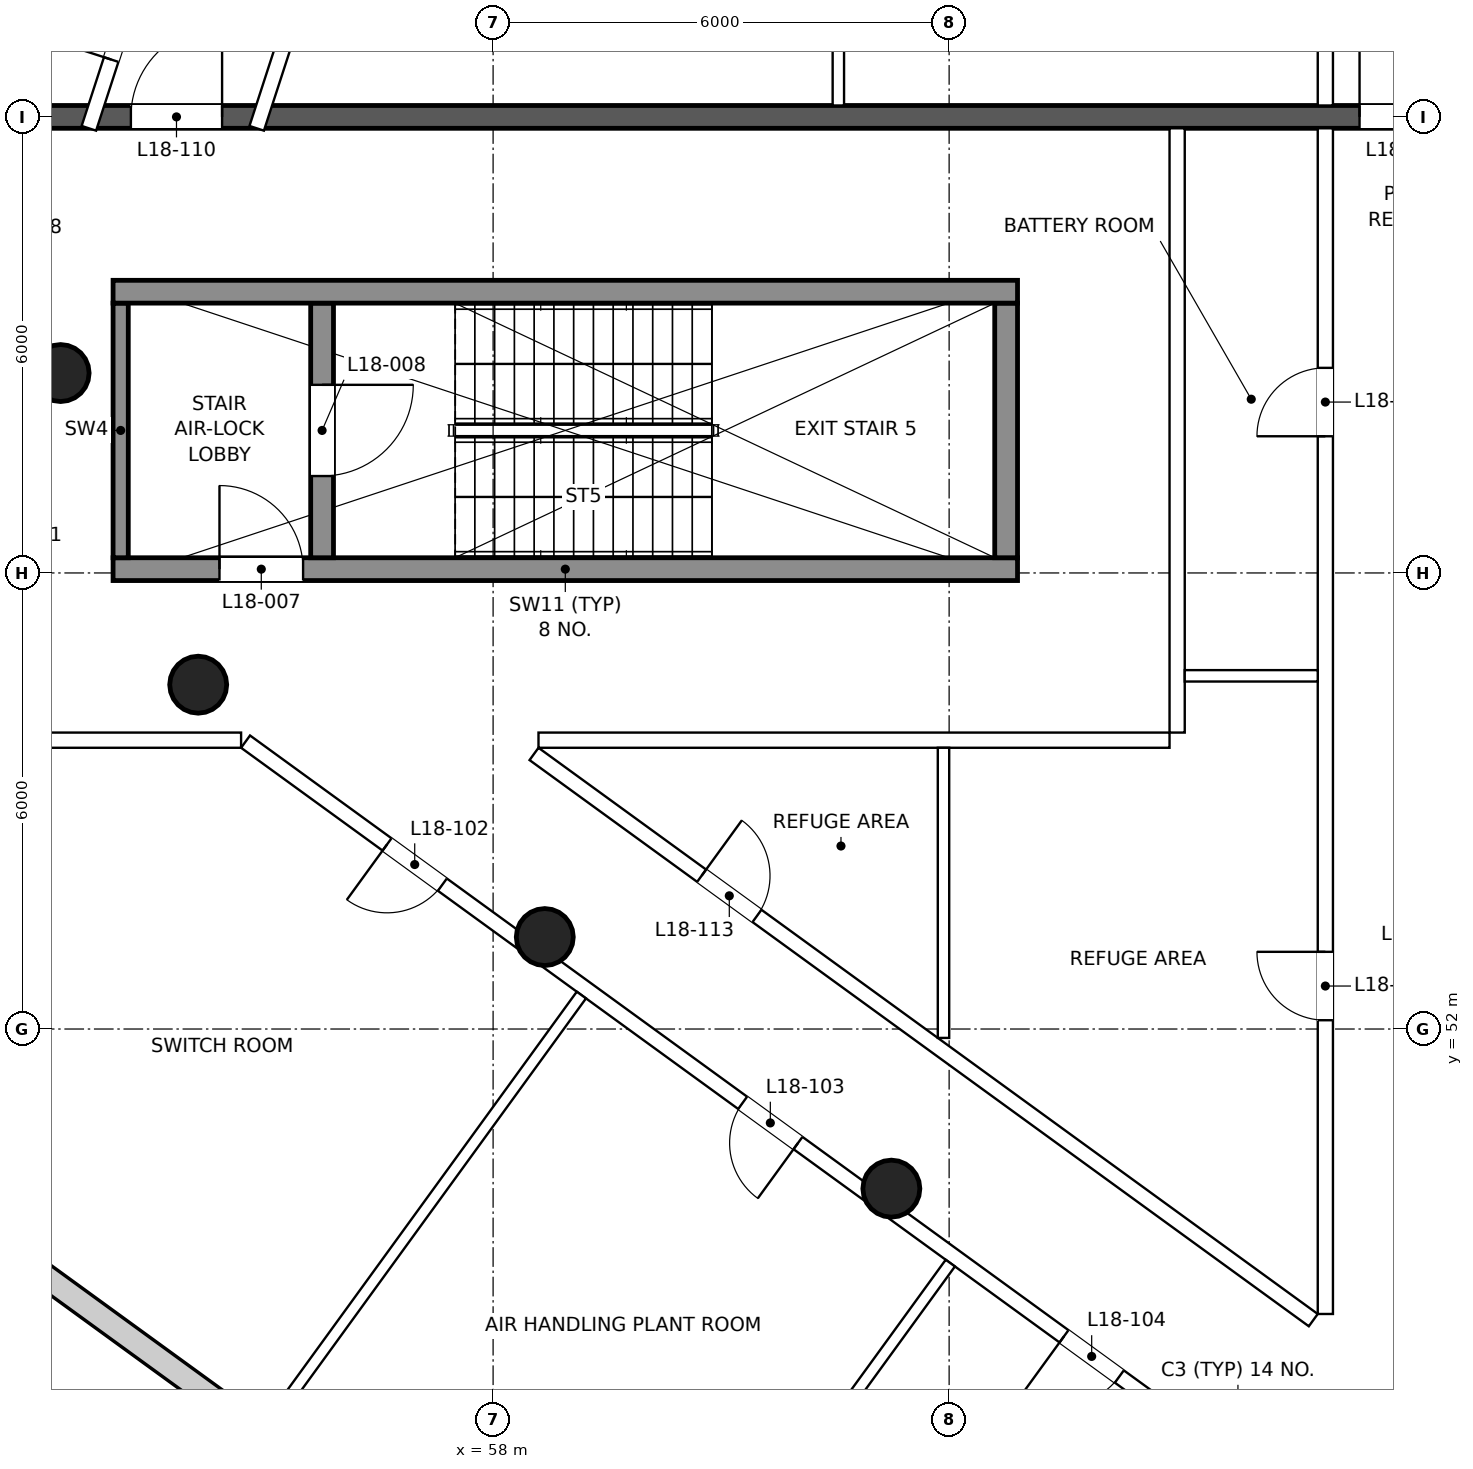
"""IFC4 building model, lengths in metres.
Left out: names, types, materials, properties, quantities, classifications, styles, units other than length and angle.
Written with IfcOpenShell. Run it as: python <this file> out.ifc"""

import sys

from ifc_helpers import new_model, si_unit, direction, frame, frame_2d, origin, origin_2d, place, context, subcontext, project, spatial, rectangle, circle, extrude, element, fill, save


model = new_model("IFC4")
c1 = context("Model", 3, precision=1e-05, world=origin(), true_north=direction((0.0, 1.0)))
c2 = subcontext(c1, "Body", "Model", "MODEL_VIEW")
j1 = project(units=[si_unit("LENGTHUNIT", "METRE"), si_unit("PLANEANGLEUNIT", "RADIAN")], contexts=[c1])
p1 = place(None, origin())
s1 = spatial("IfcSite", under=j1, at=p1, CompositionType="ELEMENT")
p2 = place(p1, origin())
s2 = spatial("IfcBuilding", under=s1, at=p2, CompositionType="ELEMENT")
p3 = place(p2, frame((0.0, 0.0, 85.8)))
s3 = spatial("IfcBuildingStorey", under=s2, at=p3, CompositionType="ELEMENT", Elevation=85.8)
for number, where, z_axis, x_axis in (
    (1, (52.31, 60.63, 0.0), (0.0, 0.0, 1.0), (1.0, 0.0, 0.0)),
    (2, (54.12, 56.53, 0.0), (0.0, 0.0, 1.0), (1.0, 0.0, 0.0)),
    (3, (58.68, 53.21, 0.0), (0.0, 0.0, 1.0), (1.0, 0.0, 0.0)),
    (4, (63.24, 49.9, 0.0), (0.0, 0.0, 1.0), (1.0, 0.0, 0.0)),
):
    element("IfcColumn", number, at=place(p3, frame(where, z_axis=z_axis, x_axis=x_axis)), inside=s3, PredefinedType="COLUMN", context=c2, shape_type="SweptSolid", body=[
        extrude(circle(Radius=0.375, at=origin_2d()), origin(), (0.0, 0.0, 1.0), 5.0),
    ])
p4 = place(p3, frame((47.033, 52.434, 0.0), z_axis=(0.0, 0.0, 1.0), x_axis=(0.809018497564, -0.587783183325, 0.0)))
e5 = element("IfcWall", 5, at=p4, inside=s3, PredefinedType="SOLIDWALL", context=c2, shape_type="SweptSolid", body=[
    extrude(rectangle(XDim=22.609, YDim=0.32, at=frame_2d((11.305, 0.0))), origin(), (0.0, 0.0, 1.0), 4.7),
])
p5 = place(p3, frame((53.0, 58.05, 0.0), z_axis=(0.0, 0.0, 1.0), x_axis=(1.0, 0.0, 0.0)))
e6 = element("IfcWall", 6, at=p5, inside=s3, PredefinedType="SHEAR", context=c2, shape_type="SweptSolid", body=[
    extrude(rectangle(XDim=11.9, YDim=0.3, at=frame_2d((5.95, 0.0))), origin(), (0.0, 0.0, 1.0), 5.0),
])
p6 = place(p5, frame((1.4, 0.0, 0.0)))
e7 = element("IfcOpeningElement", 7, at=p6, cuts=e6, PredefinedType="OPENING", context=c2, shape_type="SweptSolid", body=[
    extrude(rectangle(XDim=1.1, YDim=2.1, at=frame_2d((0.55, 1.05))), frame((0.0, 0.16, 0.0), z_axis=(0.0, -1.0, 0.0), x_axis=(1.0, 0.0, 0.0)), (0.0, 0.0, 1.0), 0.32),
])
p7 = place(p3, frame((53.1, 58.2, 0.0), z_axis=(0.0, 0.0, 1.0), x_axis=(0.0, 1.0, 0.0)))
e8 = element("IfcWall", 8, at=p7, inside=s3, PredefinedType="SHEAR", context=c2, shape_type="SweptSolid", body=[
    extrude(rectangle(XDim=3.35, YDim=0.2, at=frame_2d((1.675, 0.0))), origin(), (0.0, 0.0, 1.0), 5.0),
])
p8 = place(p3, frame((55.75, 58.2, 0.0), z_axis=(0.0, 0.0, 1.0), x_axis=(0.0, 1.0, 0.0)))
e9 = element("IfcWall", 9, at=p8, inside=s3, PredefinedType="SHEAR", context=c2, shape_type="SweptSolid", body=[
    extrude(rectangle(XDim=3.35, YDim=0.3, at=frame_2d((1.675, 0.0))), origin(), (0.0, 0.0, 1.0), 5.0),
])
p9 = place(p8, frame((1.075, 0.0, 0.0)))
e10 = element("IfcOpeningElement", 10, at=p9, cuts=e9, PredefinedType="OPENING", context=c2, shape_type="SweptSolid", body=[
    extrude(rectangle(XDim=1.2, YDim=2.1, at=frame_2d((0.6, 1.05))), frame((0.0, 0.16, 0.0), z_axis=(0.0, -1.0, 0.0), x_axis=(1.0, 0.0, 0.0)), (0.0, 0.0, 1.0), 0.32),
])
p10 = place(p3, frame((64.75, 58.2, 0.0), z_axis=(0.0, 0.0, 1.0), x_axis=(0.0, 1.0, 0.0)))
e11 = element("IfcWall", 11, at=p10, inside=s3, PredefinedType="SHEAR", context=c2, shape_type="SweptSolid", body=[
    extrude(rectangle(XDim=3.35, YDim=0.3, at=frame_2d((1.675, 0.0))), origin(), (0.0, 0.0, 1.0), 5.0),
])
p11 = place(p3, frame((53.0, 61.7, 0.0), z_axis=(0.0, 0.0, 1.0), x_axis=(1.0, 0.0, 0.0)))
e12 = element("IfcWall", 12, at=p11, inside=s3, PredefinedType="SHEAR", context=c2, shape_type="SweptSolid", body=[
    extrude(rectangle(XDim=11.9, YDim=0.3, at=frame_2d((5.95, 0.0))), origin(), (0.0, 0.0, 1.0), 5.0),
])
p12 = place(p3, frame((45.286, 64.0, 0.0), z_axis=(0.0, 0.0, 1.0), x_axis=(1.0, 0.0, 0.0)))
e13 = element("IfcWall", 13, at=p12, inside=s3, PredefinedType="PARTITIONING", context=c2, shape_type="SweptSolid", body=[
    extrude(rectangle(XDim=49.428, YDim=0.3, at=frame_2d((24.714, 0.0))), origin(), (0.0, 0.0, 1.0), 3.7),
])
p13 = place(p12, frame((7.948, 0.0, 0.0)))
e14 = element("IfcOpeningElement", 14, at=p13, cuts=e13, PredefinedType="OPENING", context=c2, shape_type="SweptSolid", body=[
    extrude(rectangle(XDim=1.2, YDim=2.1, at=frame_2d((0.6, 1.05))), frame((0.0, 0.16, 0.0), z_axis=(0.0, -1.0, 0.0), x_axis=(1.0, 0.0, 0.0)), (0.0, 0.0, 1.0), 0.32),
])
p14 = place(p12, frame((24.114, 0.0, 0.0)))
e15 = element("IfcOpeningElement", 15, at=p14, cuts=e13, PredefinedType="OPENING", context=c2, shape_type="SweptSolid", body=[
    extrude(rectangle(XDim=1.2, YDim=2.1, at=frame_2d((0.6, 1.05))), frame((0.0, 0.16, 0.0), z_axis=(0.0, -1.0, 0.0), x_axis=(1.0, 0.0, 0.0)), (0.0, 0.0, 1.0), 0.32),
])
p15 = place(p12, frame((40.28, 0.0, 0.0)))
e16 = element("IfcOpeningElement", 16, at=p15, cuts=e13, PredefinedType="OPENING", context=c2, shape_type="SweptSolid", body=[
    extrude(rectangle(XDim=1.2, YDim=2.1, at=frame_2d((0.6, 1.05))), frame((0.0, 0.16, 0.0), z_axis=(0.0, -1.0, 0.0), x_axis=(1.0, 0.0, 0.0)), (0.0, 0.0, 1.0), 0.32),
])
p16 = place(p3, frame((52.681, 63.85, 0.0), z_axis=(0.0, 0.0, 1.0), x_axis=(0.309020889227, 0.951055250772, 0.0)))
e17 = element("IfcWall", 17, at=p16, inside=s3, PredefinedType="PARTITIONING", context=c2, shape_type="SweptSolid", body=[
    extrude(rectangle(XDim=13.635, YDim=0.2, at=frame_2d((6.818, 0.0))), origin(), (0.0, 0.0, 1.0), 4.7),
])
p17 = place(p16, frame((0.951, 0.0, 0.0)))
e18 = element("IfcOpeningElement", 18, at=p17, cuts=e17, PredefinedType="OPENING", context=c2, shape_type="SweptSolid", body=[
    extrude(rectangle(XDim=0.9, YDim=2.1, at=frame_2d((0.45, 1.05))), frame((0.0, 0.11, 0.0), z_axis=(0.0, -1.0, 0.0), x_axis=(1.0, 0.0, 0.0)), (0.0, 0.0, 1.0), 0.22),
])
p18 = place(p16, frame((6.368, 0.0, 0.0)))
e19 = element("IfcOpeningElement", 19, at=p18, cuts=e17, PredefinedType="OPENING", context=c2, shape_type="SweptSolid", body=[
    extrude(rectangle(XDim=0.9, YDim=2.1, at=frame_2d((0.45, 1.05))), frame((0.0, 0.11, 0.0), z_axis=(0.0, -1.0, 0.0), x_axis=(1.0, 0.0, 0.0)), (0.0, 0.0, 1.0), 0.22),
])
p19 = place(p3, frame((67.65, 46.403, 0.0), z_axis=(0.0, 0.0, 1.0), x_axis=(-0.809010618519, 0.587794027805, 0.0)))
e20 = element("IfcWall", 20, at=p19, inside=s3, PredefinedType="PARTITIONING", context=c2, shape_type="SweptSolid", body=[
    extrude(rectangle(XDim=15.954, YDim=0.2, at=frame_2d((7.977, 0.0))), origin(), (0.0, 0.0, 1.0), 3.7),
])
p20 = place(p19, frame((12.753, 0.0, 0.0)))
e21 = element("IfcOpeningElement", 21, at=p20, cuts=e20, PredefinedType="OPENING", context=c2, shape_type="SweptSolid", body=[
    extrude(rectangle(XDim=0.9, YDim=2.1, at=frame_2d((0.45, 1.05))), frame((0.0, 0.11, 0.0), z_axis=(0.0, -1.0, 0.0), x_axis=(1.0, 0.0, 0.0)), (0.0, 0.0, 1.0), 0.22),
])
p21 = place(p19, frame((6.969, 0.0, 0.0)))
e22 = element("IfcOpeningElement", 22, at=p21, cuts=e20, PredefinedType="OPENING", context=c2, shape_type="SweptSolid", body=[
    extrude(rectangle(XDim=0.9, YDim=2.1, at=frame_2d((0.45, 1.05))), frame((0.0, 0.11, 0.0), z_axis=(0.0, -1.0, 0.0), x_axis=(1.0, 0.0, 0.0)), (0.0, 0.0, 1.0), 0.22),
])
p22 = place(p19, frame((1.743, 0.0, 0.0)))
e23 = element("IfcOpeningElement", 23, at=p22, cuts=e20, PredefinedType="OPENING", context=c2, shape_type="SweptSolid", body=[
    extrude(rectangle(XDim=0.9, YDim=2.1, at=frame_2d((0.45, 1.05))), frame((0.0, 0.11, 0.0), z_axis=(0.0, -1.0, 0.0), x_axis=(1.0, 0.0, 0.0)), (0.0, 0.0, 1.0), 0.22),
])
p23 = place(p3, frame((54.684, 55.8, 0.0), z_axis=(0.0, 0.0, 1.0), x_axis=(-1.0, 0.0, 0.0)))
e24 = element("IfcWall", 24, at=p23, inside=s3, PredefinedType="PARTITIONING", context=c2, shape_type="SweptSolid", body=[
    extrude(rectangle(XDim=3.684, YDim=0.2, at=frame_2d((1.842, 0.0))), origin(), (0.0, 0.0, 1.0), 4.7),
])
p24 = place(p3, frame((68.95, 48.251, 0.0), z_axis=(0.0, 0.0, 1.0), x_axis=(0.0, 1.0, 0.0)))
e25 = element("IfcWall", 25, at=p24, inside=s3, PredefinedType="PARTITIONING", context=c2, shape_type="SweptSolid", body=[
    extrude(rectangle(XDim=15.599, YDim=0.2, at=frame_2d((7.8, 0.0))), origin(), (0.0, 0.0, 1.0), 4.7),
])
p25 = place(p24, frame((3.865, 0.0, 0.0)))
e26 = element("IfcOpeningElement", 26, at=p25, cuts=e25, PredefinedType="OPENING", context=c2, shape_type="SweptSolid", body=[
    extrude(rectangle(XDim=0.9, YDim=2.1, at=frame_2d((0.45, 1.05))), frame((0.0, 0.11, 0.0), z_axis=(0.0, -1.0, 0.0), x_axis=(1.0, 0.0, 0.0)), (0.0, 0.0, 1.0), 0.22),
])
p26 = place(p24, frame((11.547, 0.0, 0.0)))
e27 = element("IfcOpeningElement", 27, at=p26, cuts=e25, PredefinedType="OPENING", context=c2, shape_type="SweptSolid", body=[
    extrude(rectangle(XDim=0.9, YDim=2.1, at=frame_2d((0.45, 1.05))), frame((0.0, 0.11, 0.0), z_axis=(0.0, -1.0, 0.0), x_axis=(1.0, 0.0, 0.0)), (0.0, 0.0, 1.0), 0.22),
])
p27 = place(p3, frame((68.95, 64.15, 0.0), z_axis=(0.0, 0.0, 1.0), x_axis=(0.0, 1.0, 0.0)))
e28 = element("IfcWall", 28, at=p27, inside=s3, PredefinedType="PARTITIONING", context=c2, shape_type="SweptSolid", body=[
    extrude(rectangle(XDim=4.65, YDim=0.2, at=frame_2d((2.325, 0.0))), origin(), (0.0, 0.0, 1.0), 4.7),
])
p28 = place(p27, frame((1.875, 0.0, 0.0)))
e29 = element("IfcOpeningElement", 29, at=p28, cuts=e28, PredefinedType="OPENING", context=c2, shape_type="SweptSolid", body=[
    extrude(rectangle(XDim=0.9, YDim=2.1, at=frame_2d((0.45, 1.05))), frame((0.0, 0.11, 0.0), z_axis=(0.0, -1.0, 0.0), x_axis=(1.0, 0.0, 0.0)), (0.0, 0.0, 1.0), 0.22),
])
p29 = place(p3, frame((56.508, 68.831, 0.0), z_axis=(0.0, 0.0, 1.0), x_axis=(-0.309030204086, -0.951052224099, 0.0)))
e30 = element("IfcWall", 30, at=p29, inside=s3, PredefinedType="PARTITIONING", context=c2, shape_type="SweptSolid", body=[
    extrude(rectangle(XDim=5.237, YDim=0.2, at=frame_2d((2.619, 0.0))), origin(), (0.0, 0.0, 1.0), 4.7),
])
p30 = place(p3, frame((67.0, 63.85, 0.0), z_axis=(0.0, 0.0, 1.0), x_axis=(0.0, -1.0, 0.0)))
e31 = element("IfcWall", 31, at=p30, inside=s3, PredefinedType="PARTITIONING", context=c2, shape_type="SweptSolid", body=[
    extrude(rectangle(XDim=7.95, YDim=0.2, at=frame_2d((3.975, 0.0))), origin(), (0.0, 0.0, 1.0), 4.7),
])
p31 = place(p3, frame((66.9, 55.8, 0.0), z_axis=(0.0, 0.0, 1.0), x_axis=(-1.0, 0.0, 0.0)))
e32 = element("IfcWall", 32, at=p31, inside=s3, PredefinedType="PARTITIONING", context=c2, shape_type="SweptSolid", body=[
    extrude(rectangle(XDim=8.302, YDim=0.2, at=frame_2d((4.151, 0.0))), origin(), (0.0, 0.0, 1.0), 4.7),
])
p32 = place(p3, frame((58.539, 55.619, 0.0), z_axis=(0.0, 0.0, 1.0), x_axis=(0.809018400234, -0.587783317289, 0.0)))
e33 = element("IfcWall", 33, at=p32, inside=s3, PredefinedType="PARTITIONING", context=c2, shape_type="SweptSolid", body=[
    extrude(rectangle(XDim=12.673, YDim=0.2, at=frame_2d((6.336, 0.0))), origin(), (0.0, 0.0, 1.0), 4.7),
])
p33 = place(p32, frame((2.726, 0.0, 0.0)))
e34 = element("IfcOpeningElement", 34, at=p33, cuts=e33, PredefinedType="OPENING", context=c2, shape_type="SweptSolid", body=[
    extrude(rectangle(XDim=0.9, YDim=2.1, at=frame_2d((0.45, 1.05))), frame((0.0, 0.11, 0.0), z_axis=(0.0, -1.0, 0.0), x_axis=(1.0, 0.0, 0.0)), (0.0, 0.0, 1.0), 0.22),
])
p34 = place(p3, frame((55.059, 46.8, 0.0), z_axis=(0.0, 0.0, 1.0), x_axis=(0.587786885163, 0.809015808023, 0.0)))
e35 = element("IfcWall", 35, at=p34, inside=s3, PredefinedType="PARTITIONING", context=c2, shape_type="SweptSolid", body=[
    extrude(rectangle(XDim=6.98, YDim=0.15, at=frame_2d((3.49, 0.0))), origin(), (0.0, 0.0, 1.0), 3.7),
])
p35 = place(p3, frame((59.913, 43.273, 0.0), z_axis=(0.0, 0.0, 1.0), x_axis=(0.587747359625, 0.809044523654, 0.0)))
e36 = element("IfcWall", 36, at=p35, inside=s3, PredefinedType="PARTITIONING", context=c2, shape_type="SweptSolid", body=[
    extrude(rectangle(XDim=6.98, YDim=0.15, at=frame_2d((3.49, 0.0))), origin(), (0.0, 0.0, 1.0), 4.7),
])
p36 = place(p3, frame((63.926, 51.883, 0.0), z_axis=(0.0, 0.0, 1.0), x_axis=(0.0, 1.0, 0.0)))
e37 = element("IfcWall", 37, at=p36, inside=s3, PredefinedType="PARTITIONING", context=c2, shape_type="SweptSolid", body=[
    extrude(rectangle(XDim=3.817, YDim=0.15, at=frame_2d((1.908, 0.0))), origin(), (0.0, 0.0, 1.0), 4.7),
])
p37 = place(p3, frame((67.1, 56.646, 0.0), z_axis=(0.0, 0.0, 1.0), x_axis=(1.0, 0.0, 0.0)))
e38 = element("IfcWall", 38, at=p37, inside=s3, PredefinedType="PARTITIONING", context=c2, shape_type="SweptSolid", body=[
    extrude(rectangle(XDim=1.75, YDim=0.15, at=frame_2d((0.875, 0.0))), origin(), (0.0, 0.0, 1.0), 4.7),
])
p38 = place(p3, frame((62.542, 64.15, 0.0), z_axis=(0.0, 0.0, 1.0), x_axis=(0.0, 1.0, 0.0)))
e39 = element("IfcWall", 39, at=p38, inside=s3, PredefinedType="PARTITIONING", context=c2, shape_type="SweptSolid", body=[
    extrude(rectangle(XDim=4.65, YDim=0.15, at=frame_2d((2.325, 0.0))), origin(), (0.0, 0.0, 1.0), 4.7),
])
p39 = place(p6, origin())
e40 = element("IfcDoor", 40, at=p39, inside=s3, OperationType="SINGLE_SWING_LEFT", PredefinedType="DOOR", context=c2, shape_type="SweptSolid", body=[
    extrude(rectangle(XDim=1.1, YDim=2.1, at=frame_2d((0.55, 1.05))), frame((0.0, 0.025, 0.0), z_axis=(0.0, -1.0, 0.0), x_axis=(1.0, 0.0, 0.0)), (0.0, 0.0, 1.0), 0.05),
])
fill(e7, e40)
p40 = place(p9, frame((1.2, 0.0, 0.0), z_axis=(0.0, 0.0, 1.0), x_axis=(-1.0, 0.0, 0.0)))
e41 = element("IfcDoor", 41, at=p40, inside=s3, OperationType="SINGLE_SWING_LEFT", PredefinedType="DOOR", context=c2, shape_type="SweptSolid", body=[
    extrude(rectangle(XDim=1.2, YDim=2.1, at=frame_2d((0.6, 1.05))), frame((0.0, 0.025, 0.0), z_axis=(0.0, -1.0, 0.0), x_axis=(1.0, 0.0, 0.0)), (0.0, 0.0, 1.0), 0.05),
])
fill(e10, e41)
p41 = place(p20, origin())
e42 = element("IfcDoor", 42, at=p41, inside=s3, OperationType="SINGLE_SWING_RIGHT", PredefinedType="DOOR", context=c2, shape_type="SweptSolid", body=[
    extrude(rectangle(XDim=0.9, YDim=2.1, at=frame_2d((0.45, 1.05))), frame((0.0, 0.025, 0.0), z_axis=(0.0, -1.0, 0.0), x_axis=(1.0, 0.0, 0.0)), (0.0, 0.0, 1.0), 0.05),
])
fill(e21, e42)
p42 = place(p21, origin())
e43 = element("IfcDoor", 43, at=p42, inside=s3, OperationType="SINGLE_SWING_LEFT", PredefinedType="DOOR", context=c2, shape_type="SweptSolid", body=[
    extrude(rectangle(XDim=0.9, YDim=2.1, at=frame_2d((0.45, 1.05))), frame((0.0, 0.025, 0.0), z_axis=(0.0, -1.0, 0.0), x_axis=(1.0, 0.0, 0.0)), (0.0, 0.0, 1.0), 0.05),
])
fill(e22, e43)
p43 = place(p22, origin())
e44 = element("IfcDoor", 44, at=p43, inside=s3, OperationType="SINGLE_SWING_RIGHT", PredefinedType="DOOR", context=c2, shape_type="SweptSolid", body=[
    extrude(rectangle(XDim=0.9, YDim=2.1, at=frame_2d((0.45, 1.05))), frame((0.0, 0.025, 0.0), z_axis=(0.0, -1.0, 0.0), x_axis=(1.0, 0.0, 0.0)), (0.0, 0.0, 1.0), 0.05),
])
fill(e23, e44)
p44 = place(p13, origin())
e45 = element("IfcDoor", 45, at=p44, inside=s3, OperationType="SINGLE_SWING_RIGHT", PredefinedType="DOOR", context=c2, shape_type="SweptSolid", body=[
    extrude(rectangle(XDim=1.2, YDim=2.1, at=frame_2d((0.6, 1.05))), frame((0.0, 0.025, 0.0), z_axis=(0.0, -1.0, 0.0), x_axis=(1.0, 0.0, 0.0)), (0.0, 0.0, 1.0), 0.05),
])
fill(e14, e45)
p45 = place(p14, origin())
e46 = element("IfcDoor", 46, at=p45, inside=s3, OperationType="SINGLE_SWING_LEFT", PredefinedType="DOOR", context=c2, shape_type="SweptSolid", body=[
    extrude(rectangle(XDim=1.2, YDim=2.1, at=frame_2d((0.6, 1.05))), frame((0.0, 0.025, 0.0), z_axis=(0.0, -1.0, 0.0), x_axis=(1.0, 0.0, 0.0)), (0.0, 0.0, 1.0), 0.05),
])
fill(e15, e46)
p46 = place(p33, origin())
e47 = element("IfcDoor", 47, at=p46, inside=s3, OperationType="SINGLE_SWING_LEFT", PredefinedType="DOOR", context=c2, shape_type="SweptSolid", body=[
    extrude(rectangle(XDim=0.9, YDim=2.1, at=frame_2d((0.45, 1.05))), frame((0.0, 0.025, 0.0), z_axis=(0.0, -1.0, 0.0), x_axis=(1.0, 0.0, 0.0)), (0.0, 0.0, 1.0), 0.05),
])
fill(e34, e47)
p47 = place(p25, origin())
e48 = element("IfcDoor", 48, at=p47, inside=s3, OperationType="SINGLE_SWING_RIGHT", PredefinedType="DOOR", context=c2, shape_type="SweptSolid", body=[
    extrude(rectangle(XDim=0.9, YDim=2.1, at=frame_2d((0.45, 1.05))), frame((0.0, 0.025, 0.0), z_axis=(0.0, -1.0, 0.0), x_axis=(1.0, 0.0, 0.0)), (0.0, 0.0, 1.0), 0.05),
])
fill(e26, e48)
p48 = place(p26, origin())
e49 = element("IfcDoor", 49, at=p48, inside=s3, OperationType="SINGLE_SWING_LEFT", PredefinedType="DOOR", context=c2, shape_type="SweptSolid", body=[
    extrude(rectangle(XDim=0.9, YDim=2.1, at=frame_2d((0.45, 1.05))), frame((0.0, 0.025, 0.0), z_axis=(0.0, -1.0, 0.0), x_axis=(1.0, 0.0, 0.0)), (0.0, 0.0, 1.0), 0.05),
])
fill(e27, e49)
p49 = place(p17, origin())
e50 = element("IfcDoor", 50, at=p49, inside=s3, OperationType="SINGLE_SWING_LEFT", PredefinedType="DOOR", context=c2, shape_type="SweptSolid", body=[
    extrude(rectangle(XDim=0.9, YDim=2.1, at=frame_2d((0.45, 1.05))), frame((0.0, 0.025, 0.0), z_axis=(0.0, -1.0, 0.0), x_axis=(1.0, 0.0, 0.0)), (0.0, 0.0, 1.0), 0.05),
])
fill(e18, e50)
save(model, sys.argv[1])
